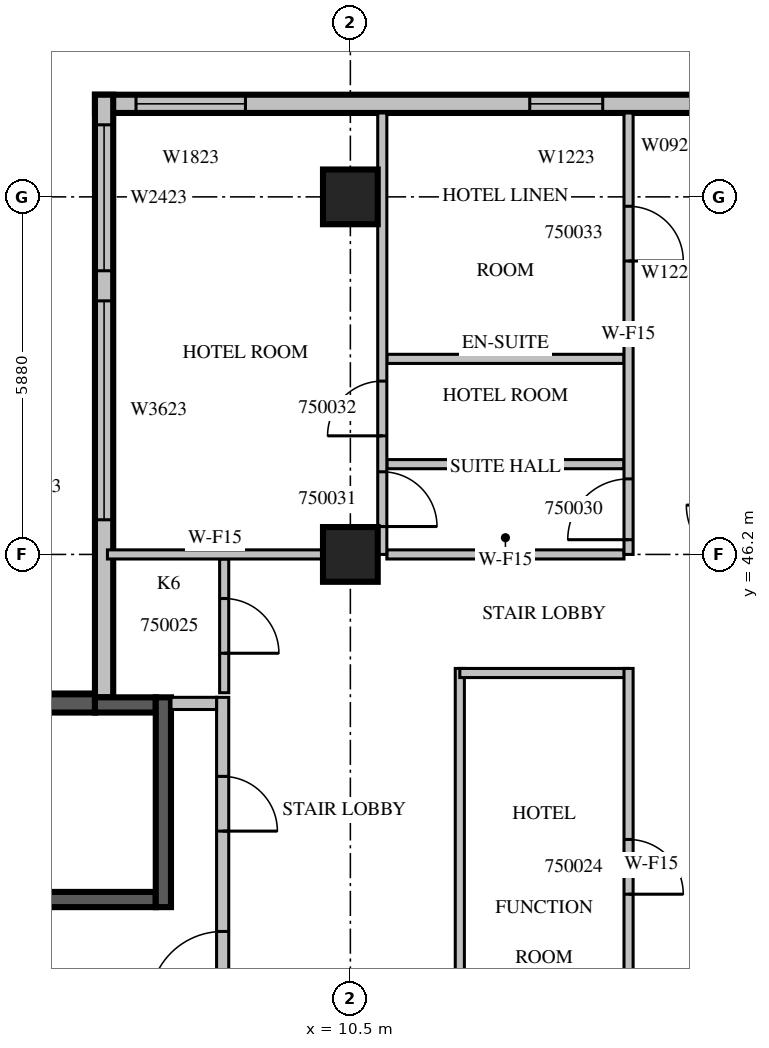
"""IFC4 building model, lengths in metres.
Left out: names, types, materials, properties, quantities, classifications, styles, units other than length and angle.
Written with IfcOpenShell. Run it as: python <this file> out.ifc"""

import sys

from ifc_helpers import new_model, si_unit, direction, frame, frame_2d, origin, origin_2d, place, context, subcontext, project, spatial, rectangle, extrude, source, transform, mapped, element, fill, save


model = new_model("IFC4")
c1 = context("Model", 3, precision=1e-05, world=origin(), true_north=direction((0.0, 1.0)))
c2 = subcontext(c1, "Body", "Model", "MODEL_VIEW")
j1 = project(units=[si_unit("LENGTHUNIT", "METRE"), si_unit("PLANEANGLEUNIT", "RADIAN")], contexts=[c1])
p1 = place(None, origin())
s1 = spatial("IfcSite", under=j1, at=p1, CompositionType="ELEMENT")
p2 = place(p1, origin())
s2 = spatial("IfcBuilding", under=s1, at=p2, CompositionType="ELEMENT")
p3 = place(p2, frame((0.0, 0.0, 223.4)))
s3 = spatial("IfcBuildingStorey", under=s2, at=p3, CompositionType="ELEMENT", Elevation=223.4)
m1 = source(origin(), c2, "Body", "SweptSolid", [
    extrude(rectangle(XDim=0.9, YDim=0.9, at=origin_2d()), origin(), (0.0, 0.0, 1.0), 3.8),
])
for number, where, z_axis, x_axis in (
    (1, (10.5, 46.2, 0.0), (0.0, 0.0, 1.0), (1.0, 0.0, 0.0)),
    (2, (10.5, 52.08, 0.0), (0.0, 0.0, 1.0), (1.0, 0.0, 0.0)),
):
    element("IfcColumn", number, at=place(p3, frame(where, z_axis=z_axis, x_axis=x_axis)), inside=s3, PredefinedType="COLUMN", context=c2, shape_type="MappedRepresentation", body=[
        mapped(m1, transform((0.0, 0.0, 0.0), scale=1.0)),
    ])
m2 = source(origin(), c2, "Body", "SweptSolid", [
    extrude(rectangle(XDim=10.5, YDim=0.3, at=frame_2d((5.25, 0.0))), origin(), (0.0, 0.0, 1.0), 3.4),
])
p4 = place(p3, frame((16.8, 53.61, 0.0), z_axis=(0.0, 0.0, 1.0), x_axis=(-1.0, 0.0, 0.0)))
e3 = element("IfcWall", 3, at=p4, inside=s3, PredefinedType="STANDARD", context=c2, shape_type="MappedRepresentation", body=[
    mapped(m2, transform((0.0, 0.0, 0.0), scale=1.0)),
])
m3 = source(origin(), c2, "Body", "SweptSolid", [
    extrude(rectangle(XDim=1.2, YDim=2.3, at=frame_2d((0.6, 1.15))), frame((0.0, 0.16, 0.0), z_axis=(0.0, -1.0, 0.0), x_axis=(1.0, 0.0, 0.0)), (0.0, 0.0, 1.0), 0.32),
])
p5 = place(p4, frame((2.15, 0.0, 0.6)))
e4 = element("IfcOpeningElement", 4, at=p5, cuts=e3, PredefinedType="OPENING", context=c2, shape_type="MappedRepresentation", body=[
    mapped(m3, transform((0.0, 0.0, 0.0), scale=1.0)),
])
m4 = source(origin(), c2, "Body", "SweptSolid", [
    extrude(rectangle(XDim=1.8, YDim=2.3, at=frame_2d((0.9, 1.15))), frame((0.0, 0.16, 0.0), z_axis=(0.0, -1.0, 0.0), x_axis=(1.0, 0.0, 0.0)), (0.0, 0.0, 1.0), 0.32),
])
p6 = place(p4, frame((8.025, 0.0, 0.6)))
e5 = element("IfcOpeningElement", 5, at=p6, cuts=e3, PredefinedType="OPENING", context=c2, shape_type="MappedRepresentation", body=[
    mapped(m4, transform((0.0, 0.0, 0.0), scale=1.0)),
])
m5 = source(origin(), c2, "Body", "SweptSolid", [
    extrude(rectangle(XDim=9.91, YDim=0.3, at=frame_2d((4.955, 0.0))), origin(), (0.0, 0.0, 1.0), 3.4),
])
p7 = place(p3, frame((6.45, 53.76, 0.0), z_axis=(0.0, 0.0, 1.0), x_axis=(0.0, -1.0, 0.0)))
e6 = element("IfcWall", 6, at=p7, inside=s3, PredefinedType="STANDARD", context=c2, shape_type="MappedRepresentation", body=[
    mapped(m5, transform((0.0, 0.0, 0.0), scale=1.0)),
])
m6 = source(origin(), c2, "Body", "SweptSolid", [
    extrude(rectangle(XDim=3.6, YDim=2.3, at=frame_2d((1.8, 1.15))), frame((0.0, 0.16, 0.0), z_axis=(0.0, -1.0, 0.0), x_axis=(1.0, 0.0, 0.0)), (0.0, 0.0, 1.0), 0.32),
])
p8 = place(p7, frame((3.39, 0.0, 0.6)))
e7 = element("IfcOpeningElement", 7, at=p8, cuts=e6, PredefinedType="OPENING", context=c2, shape_type="MappedRepresentation", body=[
    mapped(m6, transform((0.0, 0.0, 0.0), scale=1.0)),
])
m7 = source(origin(), c2, "Body", "SweptSolid", [
    extrude(rectangle(XDim=2.4, YDim=2.3, at=frame_2d((1.2, 1.15))), frame((0.0, 0.16, 0.0), z_axis=(0.0, -1.0, 0.0), x_axis=(1.0, 0.0, 0.0)), (0.0, 0.0, 1.0), 0.32),
])
p9 = place(p7, frame((0.495, 0.0, 0.6)))
e8 = element("IfcOpeningElement", 8, at=p9, cuts=e6, PredefinedType="OPENING", context=c2, shape_type="MappedRepresentation", body=[
    mapped(m7, transform((0.0, 0.0, 0.0), scale=1.0)),
])
m8 = source(origin(), c2, "Body", "SweptSolid", [
    extrude(rectangle(XDim=6.1, YDim=0.3, at=frame_2d((3.05, 0.0))), origin(), (0.0, 0.0, 1.0), 3.4),
])
p10 = place(p3, frame((6.3, 43.75, 0.0), z_axis=(0.0, 0.0, 1.0), x_axis=(-1.0, 0.0, 0.0)))
e9 = element("IfcWall", 9, at=p10, inside=s3, PredefinedType="SOLIDWALL", context=c2, shape_type="MappedRepresentation", body=[
    mapped(m8, transform((0.0, 0.0, 0.0), scale=1.0)),
])
m9 = source(origin(), c2, "Body", "SweptSolid", [
    extrude(rectangle(XDim=7.0, YDim=0.25, at=frame_2d((3.5, 0.0))), origin(), (0.0, 0.0, 1.0), 3.4),
])
p11 = place(p3, frame((0.3, 40.525, 0.0), z_axis=(0.0, 0.0, 1.0), x_axis=(1.0, 0.0, 0.0)))
e10 = element("IfcWall", 10, at=p11, inside=s3, PredefinedType="SOLIDWALL", context=c2, shape_type="MappedRepresentation", body=[
    mapped(m9, transform((0.0, 0.0, 0.0), scale=1.0)),
])
m10 = source(origin(), c2, "Body", "SweptSolid", [
    extrude(rectangle(XDim=1.1, YDim=2.1, at=frame_2d((0.55, 1.05))), frame((0.0, 0.135, 0.0), z_axis=(0.0, -1.0, 0.0), x_axis=(1.0, 0.0, 0.0)), (0.0, 0.0, 1.0), 0.27),
])
p12 = place(p11, frame((0.55, 0.0, 0.0)))
e11 = element("IfcOpeningElement", 11, at=p12, cuts=e10, PredefinedType="OPENING", context=c2, shape_type="MappedRepresentation", body=[
    mapped(m10, transform((0.0, 0.0, 0.0), scale=1.0)),
])
m11 = source(origin(), c2, "Body", "SweptSolid", [
    extrude(rectangle(XDim=1.0, YDim=0.25, at=frame_2d((0.5, 0.0))), origin(), (0.0, 0.0, 1.0), 3.4),
])
p13 = place(p3, frame((6.3, 43.725, 0.0), z_axis=(0.0, 0.0, 1.0), x_axis=(1.0, 0.0, 0.0)))
e12 = element("IfcWall", 12, at=p13, inside=s3, PredefinedType="SOLIDWALL", context=c2, shape_type="MappedRepresentation", body=[
    mapped(m11, transform((0.0, 0.0, 0.0), scale=1.0)),
])
m12 = source(origin(), c2, "Body", "SweptSolid", [
    extrude(rectangle(XDim=3.45, YDim=0.25, at=frame_2d((1.725, 0.0))), origin(), (0.0, 0.0, 1.0), 3.4),
])
p14 = place(p3, frame((7.425, 40.4, 0.0), z_axis=(0.0, 0.0, 1.0), x_axis=(0.0, 1.0, 0.0)))
e13 = element("IfcWall", 13, at=p14, inside=s3, PredefinedType="SOLIDWALL", context=c2, shape_type="MappedRepresentation", body=[
    mapped(m12, transform((0.0, 0.0, 0.0), scale=1.0)),
])
m13 = source(origin(), c2, "Body", "SweptSolid", [
    extrude(rectangle(XDim=5.45, YDim=0.2, at=frame_2d((2.725, 0.0))), origin(), (0.0, 0.0, 1.0), 3.4),
])
p15 = place(p3, frame((8.4, 38.4, 0.0), z_axis=(0.0, 0.0, 1.0), x_axis=(0.0, 1.0, 0.0)))
e14 = element("IfcWall", 14, at=p15, inside=s3, PredefinedType="PARTITIONING", context=c2, shape_type="MappedRepresentation", body=[
    mapped(m13, transform((0.0, 0.0, 0.0), scale=1.0)),
])
m14 = source(origin(), c2, "Body", "SweptSolid", [
    extrude(rectangle(XDim=1.2, YDim=2.1, at=frame_2d((0.6, 1.05))), frame((0.0, 0.11, 0.0), z_axis=(0.0, -1.0, 0.0), x_axis=(1.0, 0.0, 0.0)), (0.0, 0.0, 1.0), 0.22),
])
p16 = place(p15, frame((0.4, 0.0, 0.0)))
e15 = element("IfcOpeningElement", 15, at=p16, cuts=e14, PredefinedType="OPENING", context=c2, shape_type="MappedRepresentation", body=[
    mapped(m14, transform((0.0, 0.0, 0.0), scale=1.0)),
])
m15 = source(origin(), c2, "Body", "SweptSolid", [
    extrude(rectangle(XDim=0.9, YDim=2.1, at=frame_2d((0.45, 1.05))), frame((0.0, 0.11, 0.0), z_axis=(0.0, -1.0, 0.0), x_axis=(1.0, 0.0, 0.0)), (0.0, 0.0, 1.0), 0.22),
])
p17 = place(p15, frame((3.25, 0.0, 0.0)))
e16 = element("IfcOpeningElement", 16, at=p17, cuts=e14, PredefinedType="OPENING", context=c2, shape_type="MappedRepresentation", body=[
    mapped(m15, transform((0.0, 0.0, 0.0), scale=1.0)),
])
m16 = source(origin(), c2, "Body", "SweptSolid", [
    extrude(rectangle(XDim=0.75, YDim=0.2, at=frame_2d((0.375, 0.0))), origin(), (0.0, 0.0, 1.0), 3.4),
])
p18 = place(p3, frame((7.55, 43.75, 0.0), z_axis=(0.0, 0.0, 1.0), x_axis=(1.0, 0.0, 0.0)))
e17 = element("IfcWall", 17, at=p18, inside=s3, PredefinedType="PARTITIONING", context=c2, shape_type="MappedRepresentation", body=[
    mapped(m16, transform((0.0, 0.0, 0.0), scale=1.0)),
])
m17 = source(origin(), c2, "Body", "SweptSolid", [
    extrude(rectangle(XDim=6.45, YDim=0.15, at=frame_2d((3.225, 0.0))), origin(), (0.0, 0.0, 1.0), 3.4),
])
p19 = place(p3, frame((12.3, 44.325, 0.0), z_axis=(0.0, 0.0, 1.0), x_axis=(0.0, -1.0, 0.0)))
e18 = element("IfcWall", 18, at=p19, inside=s3, PredefinedType="PARTITIONING", context=c2, shape_type="MappedRepresentation", body=[
    mapped(m17, transform((0.0, 0.0, 0.0), scale=1.0)),
])
m18 = source(origin(), c2, "Body", "SweptSolid", [
    extrude(rectangle(XDim=2.775, YDim=0.15, at=frame_2d((1.387, 0.0))), origin(), (0.0, 0.0, 1.0), 3.4),
])
p20 = place(p3, frame((15.075, 44.25, 0.0), z_axis=(0.0, 0.0, 1.0), x_axis=(-1.0, 0.0, 0.0)))
e19 = element("IfcWall", 19, at=p20, inside=s3, PredefinedType="PARTITIONING", context=c2, shape_type="MappedRepresentation", body=[
    mapped(m18, transform((0.0, 0.0, 0.0), scale=1.0)),
])
p21 = place(p3, frame((15.075, 37.875, 0.0), z_axis=(0.0, 0.0, 1.0), x_axis=(0.0, 1.0, 0.0)))
e20 = element("IfcWall", 20, at=p21, inside=s3, PredefinedType="PARTITIONING", context=c2, shape_type="MappedRepresentation", body=[
    mapped(m17, transform((0.0, 0.0, 0.0), scale=1.0)),
])
m19 = source(origin(), c2, "Body", "SweptSolid", [
    extrude(rectangle(XDim=0.9, YDim=2.1, at=frame_2d((0.45, 1.05))), frame((0.0, 0.085, 0.0), z_axis=(0.0, -1.0, 0.0), x_axis=(1.0, 0.0, 0.0)), (0.0, 0.0, 1.0), 0.17),
])
p22 = place(p21, frame((2.737, 0.0, 0.0)))
e21 = element("IfcOpeningElement", 21, at=p22, cuts=e20, PredefinedType="OPENING", context=c2, shape_type="MappedRepresentation", body=[
    mapped(m19, transform((0.0, 0.0, 0.0), scale=1.0)),
])
m20 = source(origin(), c2, "Body", "SweptSolid", [
    extrude(rectangle(XDim=2.2, YDim=0.15, at=frame_2d((1.1, 0.0))), origin(), (0.0, 0.0, 1.0), 3.4),
])
p23 = place(p3, frame((8.425, 43.925, 0.0), z_axis=(0.0, 0.0, 1.0), x_axis=(0.0, 1.0, 0.0)))
e22 = element("IfcWall", 22, at=p23, inside=s3, PredefinedType="PARTITIONING", context=c2, shape_type="MappedRepresentation", body=[
    mapped(m20, transform((0.0, 0.0, 0.0), scale=1.0)),
])
p24 = place(p23, frame((0.65, 0.0, 0.0)))
e23 = element("IfcOpeningElement", 23, at=p24, cuts=e22, PredefinedType="OPENING", context=c2, shape_type="MappedRepresentation", body=[
    mapped(m19, transform((0.0, 0.0, 0.0), scale=1.0)),
])
m21 = source(origin(), c2, "Body", "SweptSolid", [
    extrude(rectangle(XDim=3.9, YDim=0.15, at=frame_2d((1.95, 0.0))), origin(), (0.0, 0.0, 1.0), 3.4),
])
for number, where, z_axis, x_axis in (
    (24, (15.0, 47.684, 0.0), (0.0, 0.0, 1.0), (-1.0, 0.0, 0.0)),
    (25, (15.0, 49.416, 0.0), (0.0, 0.0, 1.0), (-1.0, 0.0, 0.0)),
):
    element("IfcWall", number, at=place(p3, frame(where, z_axis=z_axis, x_axis=x_axis)), inside=s3, PredefinedType="PARTITIONING", context=c2, shape_type="MappedRepresentation", body=[
        mapped(m21, transform((0.0, 0.0, 0.0), scale=1.0)),
    ])
m22 = source(origin(), c2, "Body", "SweptSolid", [
    extrude(rectangle(XDim=3.546, YDim=0.15, at=frame_2d((1.773, 0.0))), origin(), (0.0, 0.0, 1.0), 3.4),
])
p25 = place(p3, frame((10.051, 46.2, 0.0), z_axis=(0.0, 0.0, 1.0), x_axis=(-1.0, 0.0, 0.0)))
e26 = element("IfcWall", 26, at=p25, inside=s3, PredefinedType="PARTITIONING", context=c2, shape_type="MappedRepresentation", body=[
    mapped(m22, transform((0.0, 0.0, 0.0), scale=1.0)),
])
p26 = place(p3, frame((15.0, 46.2, 0.0), z_axis=(0.0, 0.0, 1.0), x_axis=(-1.0, 0.0, 0.0)))
e27 = element("IfcWall", 27, at=p26, inside=s3, PredefinedType="PARTITIONING", context=c2, shape_type="MappedRepresentation", body=[
    mapped(m21, transform((0.0, 0.0, 0.0), scale=1.0)),
])
m23 = source(origin(), c2, "Body", "SweptSolid", [
    extrude(rectangle(XDim=7.26, YDim=0.15, at=frame_2d((3.63, 0.0))), origin(), (0.0, 0.0, 1.0), 3.4),
])
p27 = place(p3, frame((11.025, 46.2, 0.0), z_axis=(0.0, 0.0, 1.0), x_axis=(0.0, 1.0, 0.0)))
e28 = element("IfcWall", 28, at=p27, inside=s3, PredefinedType="PARTITIONING", context=c2, shape_type="MappedRepresentation", body=[
    mapped(m23, transform((0.0, 0.0, 0.0), scale=1.0)),
])
p28 = place(p27, frame((0.459, 0.0, 0.0)))
e29 = element("IfcOpeningElement", 29, at=p28, cuts=e28, PredefinedType="OPENING", context=c2, shape_type="MappedRepresentation", body=[
    mapped(m19, transform((0.0, 0.0, 0.0), scale=1.0)),
])
p29 = place(p27, frame((1.95, 0.0, 0.0)))
e30 = element("IfcOpeningElement", 30, at=p29, cuts=e28, PredefinedType="OPENING", context=c2, shape_type="MappedRepresentation", body=[
    mapped(m19, transform((0.0, 0.0, 0.0), scale=1.0)),
])
p30 = place(p3, frame((15.075, 46.2, 0.0), z_axis=(0.0, 0.0, 1.0), x_axis=(0.0, 1.0, 0.0)))
e31 = element("IfcWall", 31, at=p30, inside=s3, PredefinedType="PARTITIONING", context=c2, shape_type="MappedRepresentation", body=[
    mapped(m23, transform((0.0, 0.0, 0.0), scale=1.0)),
])
m24 = source(origin(), c2, "Body", "SweptSolid", [
    extrude(rectangle(XDim=1.0, YDim=2.1, at=frame_2d((0.5, 1.05))), frame((0.0, 0.085, 0.0), z_axis=(0.0, -1.0, 0.0), x_axis=(1.0, 0.0, 0.0)), (0.0, 0.0, 1.0), 0.17),
])
p31 = place(p30, frame((0.242, 0.0, 0.0)))
e32 = element("IfcOpeningElement", 32, at=p31, cuts=e31, PredefinedType="OPENING", context=c2, shape_type="MappedRepresentation", body=[
    mapped(m24, transform((0.0, 0.0, 0.0), scale=1.0)),
])
p32 = place(p30, frame((4.825, 0.0, 0.0)))
e33 = element("IfcOpeningElement", 33, at=p32, cuts=e31, PredefinedType="OPENING", context=c2, shape_type="MappedRepresentation", body=[
    mapped(m19, transform((0.0, 0.0, 0.0), scale=1.0)),
])
m25 = source(origin(), c2, "Body", "SweptSolid", [
    extrude(rectangle(XDim=1.2, YDim=2.3, at=frame_2d((0.6, 1.15))), frame((0.0, 0.03, 0.0), z_axis=(0.0, -1.0, 0.0), x_axis=(1.0, 0.0, 0.0)), (0.0, 0.0, 1.0), 0.06),
])
p33 = place(p5, origin())
e34 = element("IfcWindow", 34, at=p33, inside=s3, PartitioningType="SINGLE_PANEL", PredefinedType="WINDOW", context=c2, shape_type="MappedRepresentation", body=[
    mapped(m25, transform((0.0, 0.0, 0.0), scale=1.0)),
])
fill(e4, e34)
m26 = source(origin(), c2, "Body", "SweptSolid", [
    extrude(rectangle(XDim=1.8, YDim=2.3, at=frame_2d((0.9, 1.15))), frame((0.0, 0.03, 0.0), z_axis=(0.0, -1.0, 0.0), x_axis=(1.0, 0.0, 0.0)), (0.0, 0.0, 1.0), 0.06),
])
p34 = place(p6, origin())
e35 = element("IfcWindow", 35, at=p34, inside=s3, PartitioningType="SINGLE_PANEL", PredefinedType="WINDOW", context=c2, shape_type="MappedRepresentation", body=[
    mapped(m26, transform((0.0, 0.0, 0.0), scale=1.0)),
])
fill(e5, e35)
m27 = source(origin(), c2, "Body", "SweptSolid", [
    extrude(rectangle(XDim=3.6, YDim=2.3, at=frame_2d((1.8, 1.15))), frame((0.0, 0.03, 0.0), z_axis=(0.0, -1.0, 0.0), x_axis=(1.0, 0.0, 0.0)), (0.0, 0.0, 1.0), 0.06),
])
p35 = place(p8, origin())
e36 = element("IfcWindow", 36, at=p35, inside=s3, PartitioningType="SINGLE_PANEL", PredefinedType="WINDOW", context=c2, shape_type="MappedRepresentation", body=[
    mapped(m27, transform((0.0, 0.0, 0.0), scale=1.0)),
])
fill(e7, e36)
m28 = source(origin(), c2, "Body", "SweptSolid", [
    extrude(rectangle(XDim=2.4, YDim=2.3, at=frame_2d((1.2, 1.15))), frame((0.0, 0.03, 0.0), z_axis=(0.0, -1.0, 0.0), x_axis=(1.0, 0.0, 0.0)), (0.0, 0.0, 1.0), 0.06),
])
p36 = place(p9, origin())
e37 = element("IfcWindow", 37, at=p36, inside=s3, PartitioningType="SINGLE_PANEL", PredefinedType="WINDOW", context=c2, shape_type="MappedRepresentation", body=[
    mapped(m28, transform((0.0, 0.0, 0.0), scale=1.0)),
])
fill(e8, e37)
m29 = source(origin(), c2, "Body", "SweptSolid", [
    extrude(rectangle(XDim=1.2, YDim=2.1, at=frame_2d((0.6, 1.05))), frame((0.0, 0.025, 0.0), z_axis=(0.0, -1.0, 0.0), x_axis=(1.0, 0.0, 0.0)), (0.0, 0.0, 1.0), 0.05),
])
p37 = place(p16, origin())
e38 = element("IfcDoor", 38, at=p37, inside=s3, OperationType="SINGLE_SWING_LEFT", PredefinedType="DOOR", context=c2, shape_type="MappedRepresentation", body=[
    mapped(m29, transform((0.0, 0.0, 0.0), scale=1.0)),
])
fill(e15, e38)
m30 = source(origin(), c2, "Body", "SweptSolid", [
    extrude(rectangle(XDim=0.9, YDim=2.1, at=frame_2d((0.45, 1.05))), frame((0.0, 0.025, 0.0), z_axis=(0.0, -1.0, 0.0), x_axis=(1.0, 0.0, 0.0)), (0.0, 0.0, 1.0), 0.05),
])
p38 = place(p17, origin())
e39 = element("IfcDoor", 39, at=p38, inside=s3, OperationType="SINGLE_SWING_RIGHT", PredefinedType="DOOR", context=c2, shape_type="MappedRepresentation", body=[
    mapped(m30, transform((0.0, 0.0, 0.0), scale=1.0)),
])
fill(e16, e39)
p39 = place(p22, origin())
e40 = element("IfcDoor", 40, at=p39, inside=s3, OperationType="SINGLE_SWING_RIGHT", PredefinedType="DOOR", context=c2, shape_type="MappedRepresentation", body=[
    mapped(m30, transform((0.0, 0.0, 0.0), scale=1.0)),
])
fill(e21, e40)
p40 = place(p24, origin())
e41 = element("IfcDoor", 41, at=p40, inside=s3, OperationType="SINGLE_SWING_RIGHT", PredefinedType="DOOR", context=c2, shape_type="MappedRepresentation", body=[
    mapped(m30, transform((0.0, 0.0, 0.0), scale=1.0)),
])
fill(e23, e41)
m31 = source(origin(), c2, "Body", "SweptSolid", [
    extrude(rectangle(XDim=1.0, YDim=2.1, at=frame_2d((0.5, 1.05))), frame((0.0, 0.025, 0.0), z_axis=(0.0, -1.0, 0.0), x_axis=(1.0, 0.0, 0.0)), (0.0, 0.0, 1.0), 0.05),
])
p41 = place(p31, origin())
e42 = element("IfcDoor", 42, at=p41, inside=s3, OperationType="SINGLE_SWING_LEFT", PredefinedType="DOOR", context=c2, shape_type="MappedRepresentation", body=[
    mapped(m31, transform((0.0, 0.0, 0.0), scale=1.0)),
])
fill(e32, e42)
p42 = place(p28, origin())
e43 = element("IfcDoor", 43, at=p42, inside=s3, OperationType="SINGLE_SWING_RIGHT", PredefinedType="DOOR", context=c2, shape_type="MappedRepresentation", body=[
    mapped(m30, transform((0.0, 0.0, 0.0), scale=1.0)),
])
fill(e29, e43)
p43 = place(p29, origin())
e44 = element("IfcDoor", 44, at=p43, inside=s3, OperationType="SINGLE_SWING_LEFT", PredefinedType="DOOR", context=c2, shape_type="MappedRepresentation", body=[
    mapped(m30, transform((0.0, 0.0, 0.0), scale=1.0)),
])
fill(e30, e44)
p44 = place(p32, origin())
e45 = element("IfcDoor", 45, at=p44, inside=s3, OperationType="SINGLE_SWING_RIGHT", PredefinedType="DOOR", context=c2, shape_type="MappedRepresentation", body=[
    mapped(m30, transform((0.0, 0.0, 0.0), scale=1.0)),
])
fill(e33, e45)
save(model, sys.argv[1])
